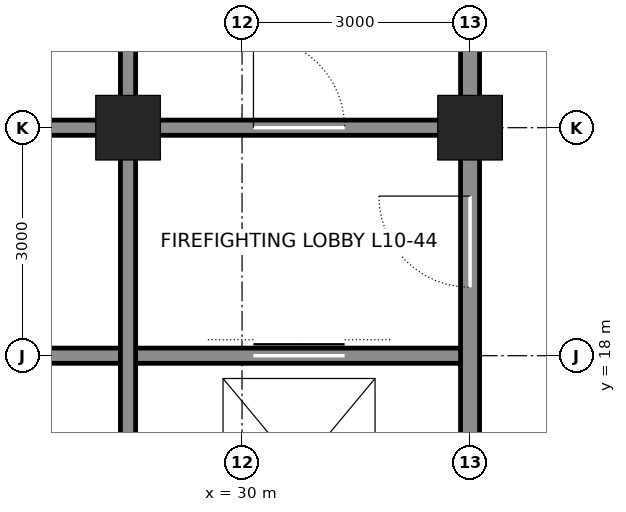
"""IFC4 building model, lengths in metres.
Left out: names, types, materials, properties, quantities, classifications, styles, units other than length and angle.
Written with IfcOpenShell. Run it as: python <this file> out.ifc"""

import sys

from ifc_helpers import new_model, si_unit, direction, frame, frame_2d, origin, origin_2d, place, context, subcontext, project, spatial, rectangle, hollow_rectangle, extrude, element, fill, save


model = new_model("IFC4")
c1 = context("Model", 3, precision=1e-05, world=origin(), true_north=direction((0.0, 1.0)))
c2 = subcontext(c1, "Body", "Model", "MODEL_VIEW")
j1 = project(units=[si_unit("LENGTHUNIT", "METRE"), si_unit("PLANEANGLEUNIT", "RADIAN")], contexts=[c1])
p1 = place(None, origin())
s1 = spatial("IfcSite", under=j1, at=p1, CompositionType="ELEMENT")
p2 = place(p1, origin())
s2 = spatial("IfcBuilding", under=s1, at=p2, CompositionType="ELEMENT")
p3 = place(p2, frame((0.0, 0.0, 51.3)))
s3 = spatial("IfcBuildingStorey", under=s2, at=p3, CompositionType="ELEMENT", Elevation=51.3)
for number, where, z_axis, x_axis in (
    (1, (33.0, 21.0, 0.0), (0.0, 0.0, 1.0), (1.0, 0.0, 0.0)),
    (2, (28.5, 21.0, 0.0), (0.0, 0.0, 1.0), (1.0, 0.0, 0.0)),
):
    element("IfcColumn", number, at=place(p3, frame(where, z_axis=z_axis, x_axis=x_axis)), inside=s3, PredefinedType="COLUMN", context=c2, shape_type="SweptSolid", body=[
        extrude(hollow_rectangle(XDim=0.85, YDim=0.85, WallThickness=0.085, at=origin_2d()), origin(), (0.0, 0.0, 1.0), 4.5),
    ])
p4 = place(p3, frame((25.5, 18.0, 0.0), z_axis=(0.0, 0.0, 1.0), x_axis=(1.0, 0.0, 0.0)))
e3 = element("IfcWall", 3, at=p4, inside=s3, PredefinedType="SOLIDWALL", context=c2, shape_type="SweptSolid", body=[
    extrude(rectangle(XDim=7.5, YDim=0.2, at=frame_2d((3.75, 0.0))), origin(), (0.0, 0.0, 1.0), 4.34),
])
p5 = place(p4, frame((4.65, 0.0, 0.0)))
e4 = element("IfcOpeningElement", 4, at=p5, cuts=e3, PredefinedType="OPENING", context=c2, shape_type="SweptSolid", body=[
    extrude(rectangle(XDim=1.2, YDim=2.1, at=frame_2d((0.6, 1.05))), frame((0.0, 0.11, 0.0), z_axis=(0.0, -1.0, 0.0), x_axis=(1.0, 0.0, 0.0)), (0.0, 0.0, 1.0), 0.22),
])
p6 = place(p3, frame((25.5, 21.0, 0.0), z_axis=(0.0, 0.0, 1.0), x_axis=(1.0, 0.0, 0.0)))
e5 = element("IfcWall", 5, at=p6, inside=s3, PredefinedType="SOLIDWALL", context=c2, shape_type="SweptSolid", body=[
    extrude(rectangle(XDim=2.75, YDim=0.2, at=frame_2d((1.375, 0.0))), origin(), (0.0, 0.0, 1.0), 3.39),
])
p7 = place(p3, frame((28.75, 21.0, 0.0), z_axis=(0.0, 0.0, 1.0), x_axis=(1.0, 0.0, 0.0)))
e6 = element("IfcWall", 6, at=p7, inside=s3, PredefinedType="SOLIDWALL", context=c2, shape_type="SweptSolid", body=[
    extrude(rectangle(XDim=4.0, YDim=0.2, at=frame_2d((2.0, 0.0))), origin(), (0.0, 0.0, 1.0), 3.39),
])
p8 = place(p7, frame((1.4, 0.0, 0.0)))
e7 = element("IfcOpeningElement", 7, at=p8, cuts=e6, PredefinedType="OPENING", context=c2, shape_type="SweptSolid", body=[
    extrude(rectangle(XDim=1.2, YDim=2.1, at=frame_2d((0.6, 1.05))), frame((0.0, 0.11, 0.0), z_axis=(0.0, -1.0, 0.0), x_axis=(1.0, 0.0, 0.0)), (0.0, 0.0, 1.0), 0.22),
])
p9 = place(p3, frame((28.5, 12.25, 0.0), z_axis=(0.0, 0.0, 1.0), x_axis=(0.0, 1.0, 0.0)))
e8 = element("IfcWall", 8, at=p9, inside=s3, PredefinedType="SOLIDWALL", context=c2, shape_type="SweptSolid", body=[
    extrude(rectangle(XDim=8.5, YDim=0.2, at=frame_2d((4.25, 0.0))), origin(), (0.0, 0.0, 1.0), 3.413),
])
p10 = place(p3, frame((28.5, 21.25, 0.0), z_axis=(0.0, 0.0, 1.0), x_axis=(0.0, 1.0, 0.0)))
e9 = element("IfcWall", 9, at=p10, inside=s3, PredefinedType="SOLIDWALL", context=c2, shape_type="SweptSolid", body=[
    extrude(rectangle(XDim=2.5, YDim=0.2, at=frame_2d((1.25, 0.0))), origin(), (0.0, 0.0, 1.0), 3.413),
])
p11 = place(p3, frame((33.0, 12.25, 0.0), z_axis=(0.0, 0.0, 1.0), x_axis=(0.0, 1.0, 0.0)))
e10 = element("IfcWall", 10, at=p11, inside=s3, PredefinedType="SOLIDWALL", context=c2, shape_type="SweptSolid", body=[
    extrude(rectangle(XDim=8.5, YDim=0.25, at=frame_2d((4.25, 0.0))), origin(), (0.0, 0.0, 1.0), 3.113),
])
p12 = place(p11, frame((6.65, 0.0, 0.0)))
e11 = element("IfcOpeningElement", 11, at=p12, cuts=e10, PredefinedType="OPENING", context=c2, shape_type="SweptSolid", body=[
    extrude(rectangle(XDim=1.2, YDim=2.1, at=frame_2d((0.6, 1.05))), frame((0.0, 0.135, 0.0), z_axis=(0.0, -1.0, 0.0), x_axis=(1.0, 0.0, 0.0)), (0.0, 0.0, 1.0), 0.27),
])
p13 = place(p11, frame((0.875, 0.0, 0.0)))
e12 = element("IfcOpeningElement", 12, at=p13, cuts=e10, PredefinedType="OPENING", context=c2, shape_type="SweptSolid", body=[
    extrude(rectangle(XDim=0.75, YDim=2.1, at=frame_2d((0.375, 1.05))), frame((0.0, 0.135, 0.0), z_axis=(0.0, -1.0, 0.0), x_axis=(1.0, 0.0, 0.0)), (0.0, 0.0, 1.0), 0.27),
])
p14 = place(p3, frame((33.0, 21.25, 0.0), z_axis=(0.0, 0.0, 1.0), x_axis=(0.0, 1.0, 0.0)))
e13 = element("IfcWall", 13, at=p14, inside=s3, PredefinedType="SOLIDWALL", context=c2, shape_type="SweptSolid", body=[
    extrude(rectangle(XDim=2.5, YDim=0.25, at=frame_2d((1.25, 0.0))), origin(), (0.0, 0.0, 1.0), 3.113),
])
p15 = place(p8, origin())
e14 = element("IfcDoor", 14, at=p15, inside=s3, OperationType="SINGLE_SWING_LEFT", PredefinedType="DOOR", context=c2, shape_type="SweptSolid", body=[
    extrude(rectangle(XDim=1.2, YDim=2.1, at=frame_2d((0.6, 1.05))), frame((0.0, 0.025, 0.0), z_axis=(0.0, -1.0, 0.0), x_axis=(1.0, 0.0, 0.0)), (0.0, 0.0, 1.0), 0.05),
])
fill(e7, e14)
p16 = place(p12, origin())
e15 = element("IfcDoor", 15, at=p16, inside=s3, OperationType="SINGLE_SWING_RIGHT", PredefinedType="DOOR", context=c2, shape_type="SweptSolid", body=[
    extrude(rectangle(XDim=1.2, YDim=2.1, at=frame_2d((0.6, 1.05))), frame((0.0, 0.025, 0.0), z_axis=(0.0, -1.0, 0.0), x_axis=(1.0, 0.0, 0.0)), (0.0, 0.0, 1.0), 0.05),
])
fill(e11, e15)
p17 = place(p5, origin())
e16 = element("IfcDoor", 16, at=p17, inside=s3, OperationType="DOUBLE_DOOR_SLIDING", PredefinedType="DOOR", context=c2, shape_type="SweptSolid", body=[
    extrude(rectangle(XDim=1.2, YDim=2.1, at=frame_2d((0.6, 1.05))), frame((0.0, 0.025, 0.0), z_axis=(0.0, -1.0, 0.0), x_axis=(1.0, 0.0, 0.0)), (0.0, 0.0, 1.0), 0.05),
])
fill(e4, e16)
save(model, sys.argv[1])
